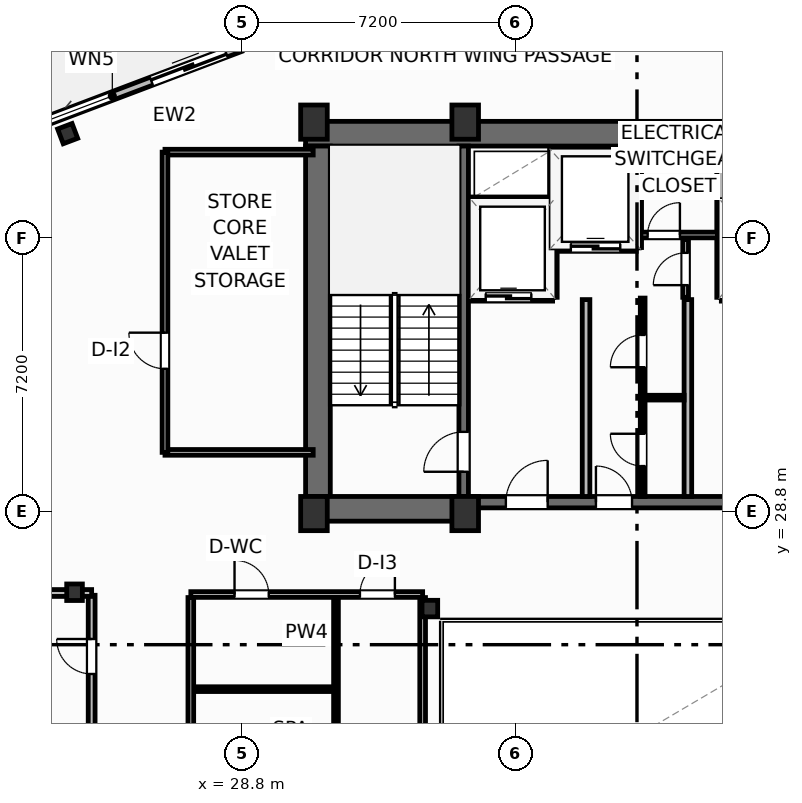
"""IFC4 building model, lengths in metres.
Left out: names, types, materials, properties, quantities, classifications, styles, units other than length and angle.
Written with IfcOpenShell. Run it as: python <this file> out.ifc"""

import sys

from ifc_helpers import new_model, si_unit, direction, frame, frame_2d, origin, origin_2d, place, context, subcontext, project, spatial, rectangle, i_section, extrude, element, fill, save


model = new_model("IFC4")
c1 = context("Model", 3, precision=1e-05, world=origin(), true_north=direction((0.0, 1.0)))
c2 = subcontext(c1, "Body", "Model", "MODEL_VIEW")
j1 = project(units=[si_unit("LENGTHUNIT", "METRE"), si_unit("PLANEANGLEUNIT", "RADIAN")], contexts=[c1])
p1 = place(None, origin())
s1 = spatial("IfcSite", under=j1, at=p1, CompositionType="ELEMENT")
p2 = place(p1, origin())
s2 = spatial("IfcBuilding", under=s1, at=p2, CompositionType="ELEMENT")
p3 = place(p2, frame((0.0, 0.0, 242.3)))
s3 = spatial("IfcBuildingStorey", under=s2, at=p3, CompositionType="ELEMENT", Elevation=242.3)
for number, where, z_axis, x_axis in (
    (1, (30.7, 28.75, 0.0), (0.0, 0.0, 1.0), (1.0, 0.0, 0.0)),
    (2, (34.68, 28.75, 0.0), (0.0, 0.0, 1.0), (1.0, 0.0, 0.0)),
    (3, (30.7, 39.05, 0.0), (0.0, 0.0, 1.0), (1.0, 0.0, 0.0)),
    (4, (34.68, 39.05, 0.0), (0.0, 0.0, 1.0), (1.0, 0.0, 0.0)),
):
    element("IfcColumn", number, at=place(p3, frame(where, z_axis=z_axis, x_axis=x_axis)), inside=s3, PredefinedType="COLUMN", context=c2, shape_type="SweptSolid", body=[
        extrude(rectangle(XDim=0.7, YDim=0.9, at=origin_2d()), origin(), (0.0, 0.0, 1.0), 3.7),
    ])
for number, where, z_axis, x_axis in (
    (5, (33.75, 26.25, 0.0), (0.0, 0.0, 1.0), (1.0, 0.0, 0.0)),
    (6, (24.4, 26.68, 0.0), (0.0, 0.0, 1.0), (1.0, 0.0, 0.0)),
):
    element("IfcColumn", number, at=place(p3, frame(where, z_axis=z_axis, x_axis=x_axis)), inside=s3, PredefinedType="COLUMN", context=c2, shape_type="SweptSolid", body=[
        extrude(i_section(OverallWidth=0.412, OverallDepth=0.435, WebThickness=0.036, FlangeThickness=0.057, FilletRadius=0.025, at=origin_2d()), origin(), (0.0, 0.0, 1.0), 3.7),
    ])
p4 = place(p3, frame((30.48, 38.745, 0.0), z_axis=(0.0, 0.0, 1.0), x_axis=(1.0, 0.0, 0.0)))
e7 = element("IfcWall", 7, at=p4, inside=s3, PredefinedType="SHEAR", context=c2, shape_type="SweptSolid", body=[
    extrude(rectangle(XDim=17.44, YDim=0.65, at=frame_2d((8.72, 0.0))), origin(), (0.0, 0.0, 1.0), 3.45),
])
p5 = place(p3, frame((30.805, 29.2, 0.0), z_axis=(0.0, 0.0, 1.0), x_axis=(0.0, 1.0, 0.0)))
e8 = element("IfcWall", 8, at=p5, inside=s3, PredefinedType="SHEAR", context=c2, shape_type="SweptSolid", body=[
    extrude(rectangle(XDim=9.22, YDim=0.65, at=frame_2d((4.61, 0.0))), origin(), (0.0, 0.0, 1.0), 3.45),
])
p6 = place(p3, frame((30.48, 28.875, 0.0), z_axis=(0.0, 0.0, 1.0), x_axis=(1.0, 0.0, 0.0)))
e9 = element("IfcWall", 9, at=p6, inside=s3, PredefinedType="SHEAR", context=c2, shape_type="SweptSolid", body=[
    extrude(rectangle(XDim=4.32, YDim=0.65, at=frame_2d((2.16, 0.0))), origin(), (0.0, 0.0, 1.0), 3.45),
])
p7 = place(p3, frame((34.8, 29.05, 0.0), z_axis=(0.0, 0.0, 1.0), x_axis=(1.0, 0.0, 0.0)))
e10 = element("IfcWall", 10, at=p7, inside=s3, PredefinedType="SHEAR", context=c2, shape_type="SweptSolid", body=[
    extrude(rectangle(XDim=8.8, YDim=0.3, at=frame_2d((4.4, 0.0))), origin(), (0.0, 0.0, 1.0), 3.45),
])
p8 = place(p7, frame((0.95, 0.0, 0.0)))
e11 = element("IfcOpeningElement", 11, at=p8, cuts=e10, PredefinedType="OPENING", context=c2, shape_type="SweptSolid", body=[
    extrude(rectangle(XDim=1.1, YDim=2.15, at=frame_2d((0.55, 1.075))), frame((0.0, 0.16, 0.0), z_axis=(0.0, -1.0, 0.0), x_axis=(1.0, 0.0, 0.0)), (0.0, 0.0, 1.0), 0.32),
])
p9 = place(p7, frame((6.75, 0.0, 0.0)))
e12 = element("IfcOpeningElement", 12, at=p9, cuts=e10, PredefinedType="OPENING", context=c2, shape_type="SweptSolid", body=[
    extrude(rectangle(XDim=1.1, YDim=2.15, at=frame_2d((0.55, 1.075))), frame((0.0, 0.16, 0.0), z_axis=(0.0, -1.0, 0.0), x_axis=(1.0, 0.0, 0.0)), (0.0, 0.0, 1.0), 0.32),
])
p10 = place(p7, frame((3.32, 0.0, 0.0)))
e13 = element("IfcOpeningElement", 13, at=p10, cuts=e10, PredefinedType="OPENING", context=c2, shape_type="SweptSolid", body=[
    extrude(rectangle(XDim=0.95, YDim=2.15, at=frame_2d((0.475, 1.075))), frame((0.0, 0.16, 0.0), z_axis=(0.0, -1.0, 0.0), x_axis=(1.0, 0.0, 0.0)), (0.0, 0.0, 1.0), 0.32),
])
p11 = place(p3, frame((34.64, 29.2, 0.0), z_axis=(0.0, 0.0, 1.0), x_axis=(0.0, 1.0, 0.0)))
e14 = element("IfcWall", 14, at=p11, inside=s3, PredefinedType="SHEAR", context=c2, shape_type="SweptSolid", body=[
    extrude(rectangle(XDim=9.22, YDim=0.25, at=frame_2d((4.61, 0.0))), origin(), (0.0, 0.0, 1.0), 3.45),
])
p12 = place(p11, frame((0.65, 0.0, 0.0)))
e15 = element("IfcOpeningElement", 15, at=p12, cuts=e14, PredefinedType="OPENING", context=c2, shape_type="SweptSolid", body=[
    extrude(rectangle(XDim=1.05, YDim=2.15, at=frame_2d((0.525, 1.075))), frame((0.0, 0.135, 0.0), z_axis=(0.0, -1.0, 0.0), x_axis=(1.0, 0.0, 0.0)), (0.0, 0.0, 1.0), 0.27),
])
p13 = place(p3, frame((24.219, 38.747, 0.0), z_axis=(0.0, 0.0, 1.0), x_axis=(0.935221751401, 0.354062530786, 0.0)))
e16 = element("IfcColumn", 16, at=p13, inside=s3, PredefinedType="COLUMN", context=c2, shape_type="SweptSolid", body=[
    extrude(i_section(OverallWidth=0.406, OverallDepth=0.416, WebThickness=0.03, FlangeThickness=0.048, FilletRadius=0.025, at=origin_2d()), origin(), (0.0, 0.0, 1.0), 3.7),
])
p14 = place(p3, frame((23.149, 38.887, 0.0), z_axis=(0.0, 0.0, 1.0), x_axis=(0.9352192676, 0.354069091436, 0.0)))
e17 = element("IfcWall", 17, at=p14, inside=s3, PredefinedType="SOLIDWALL", context=c2, shape_type="SweptSolid", body=[
    extrude(rectangle(XDim=6.0, YDim=0.22, at=frame_2d((3.0, 0.0))), origin(), (0.0, 0.0, 1.0), 2.73),
])
p15 = place(p14, frame((3.5, 0.0, 0.0)))
e18 = element("IfcOpeningElement", 18, at=p15, cuts=e17, PredefinedType="OPENING", context=c2, shape_type="SweptSolid", body=[
    extrude(rectangle(XDim=2.1, YDim=2.3, at=frame_2d((1.05, 1.15))), frame((0.0, 0.12, 0.0), z_axis=(0.0, -1.0, 0.0), x_axis=(1.0, 0.0, 0.0)), (0.0, 0.0, 1.0), 0.24),
])
p16 = place(p14, frame((0.55, 0.0, 0.75)))
e19 = element("IfcOpeningElement", 19, at=p16, cuts=e17, PredefinedType="OPENING", context=c2, shape_type="SweptSolid", body=[
    extrude(rectangle(XDim=1.85, YDim=1.75, at=frame_2d((0.925, 0.875))), frame((0.0, 0.12, 0.0), z_axis=(0.0, -1.0, 0.0), x_axis=(1.0, 0.0, 0.0)), (0.0, 0.0, 1.0), 0.24),
])
p17 = place(p3, frame((24.85, 23.03, 0.0), z_axis=(0.0, 0.0, 1.0), x_axis=(0.0, 1.0, 0.0)))
e20 = element("IfcWall", 20, at=p17, inside=s3, PredefinedType="PARTITIONING", context=c2, shape_type="SweptSolid", body=[
    extrude(rectangle(XDim=3.57, YDim=0.18, at=frame_2d((1.785, 0.0))), origin(), (0.0, 0.0, 1.0), 3.45),
])
p18 = place(p17, frame((1.5, 0.0, 0.0)))
e21 = element("IfcOpeningElement", 21, at=p18, cuts=e20, PredefinedType="OPENING", context=c2, shape_type="SweptSolid", body=[
    extrude(rectangle(XDim=0.92, YDim=2.05, at=frame_2d((0.46, 1.025))), frame((0.0, 0.1, 0.0), z_axis=(0.0, -1.0, 0.0), x_axis=(1.0, 0.0, 0.0)), (0.0, 0.0, 1.0), 0.2),
])
p19 = place(p3, frame((3.482, 26.66, 0.0), z_axis=(0.0, 0.0, 1.0), x_axis=(1.0, 0.0, 0.0)))
e22 = element("IfcWall", 22, at=p19, inside=s3, PredefinedType="PARTITIONING", context=c2, shape_type="SweptSolid", body=[
    extrude(rectangle(XDim=21.368, YDim=0.18, at=frame_2d((10.684, 0.0))), origin(), (0.0, 0.0, 1.0), 2.662),
])
for number, where, z_axis, x_axis in (
    (23, (37.86, 29.2, 0.0), (0.0, 0.0, 1.0), (0.0, 1.0, 0.0)),
    (24, (40.54, 29.2, 0.0), (0.0, 0.0, 1.0), (0.0, 1.0, 0.0)),
):
    element("IfcWall", number, at=place(p3, frame(where, z_axis=z_axis, x_axis=x_axis)), inside=s3, PredefinedType="PARTITIONING", context=c2, shape_type="SweptSolid", body=[
        extrude(rectangle(XDim=5.18, YDim=0.2, at=frame_2d((2.59, 0.0))), origin(), (0.0, 0.0, 1.0), 3.45),
    ])
p20 = place(p3, frame((34.8, 34.44, 0.0), z_axis=(0.0, 0.0, 1.0), x_axis=(1.0, 0.0, 0.0)))
e25 = element("IfcWall", 25, at=p20, inside=s3, PredefinedType="PARTITIONING", context=c2, shape_type="SweptSolid", body=[
    extrude(rectangle(XDim=2.18, YDim=0.2, at=frame_2d((1.09, 0.0))), origin(), (0.0, 0.0, 1.0), 3.45),
])
p21 = place(p20, frame((0.42, 0.0, 0.0)))
e26 = element("IfcOpeningElement", 26, at=p21, cuts=e25, PredefinedType="OPENING", context=c2, shape_type="SweptSolid", body=[
    extrude(rectangle(XDim=1.2, YDim=2.2, at=frame_2d((0.6, 1.1))), frame((0.0, 0.11, 0.0), z_axis=(0.0, -1.0, 0.0), x_axis=(1.0, 0.0, 0.0)), (0.0, 0.0, 1.0), 0.22),
])
p22 = place(p3, frame((34.8, 36.98, 0.0), z_axis=(0.0, 0.0, 1.0), x_axis=(1.0, 0.0, 0.0)))
e27 = element("IfcWall", 27, at=p22, inside=s3, PredefinedType="PARTITIONING", context=c2, shape_type="SweptSolid", body=[
    extrude(rectangle(XDim=2.18, YDim=0.2, at=frame_2d((1.09, 0.0))), origin(), (0.0, 0.0, 1.0), 3.45),
])
for number, where, z_axis, x_axis in (
    (28, (37.0, 34.44, 0.0), (0.0, 0.0, 1.0), (0.0, 1.0, 0.0)),
    (29, (41.4, 34.44, 0.0), (0.0, 0.0, 1.0), (0.0, 1.0, 0.0)),
):
    element("IfcWall", number, at=place(p3, frame(where, z_axis=z_axis, x_axis=x_axis)), inside=s3, PredefinedType="PARTITIONING", context=c2, shape_type="SweptSolid", body=[
        extrude(rectangle(XDim=3.9, YDim=0.2, at=frame_2d((1.95, 0.0))), origin(), (0.0, 0.0, 1.0), 3.45),
    ])
p23 = place(p3, frame((37.06, 35.75, 0.0), z_axis=(0.0, 0.0, 1.0), x_axis=(1.0, 0.0, 0.0)))
e30 = element("IfcWall", 30, at=p23, inside=s3, PredefinedType="PARTITIONING", context=c2, shape_type="SweptSolid", body=[
    extrude(rectangle(XDim=2.12, YDim=0.2, at=frame_2d((1.06, 0.0))), origin(), (0.0, 0.0, 1.0), 3.45),
])
p24 = place(p23, frame((0.4, 0.0, 0.0)))
e31 = element("IfcOpeningElement", 31, at=p24, cuts=e30, PredefinedType="OPENING", context=c2, shape_type="SweptSolid", body=[
    extrude(rectangle(XDim=1.3, YDim=2.2, at=frame_2d((0.65, 1.1))), frame((0.0, 0.11, 0.0), z_axis=(0.0, -1.0, 0.0), x_axis=(1.0, 0.0, 0.0)), (0.0, 0.0, 1.0), 0.22),
])
p25 = place(p3, frame((39.22, 35.75, 0.0), z_axis=(0.0, 0.0, 1.0), x_axis=(0.0, 1.0, 0.0)))
e32 = element("IfcWall", 32, at=p25, inside=s3, PredefinedType="PARTITIONING", context=c2, shape_type="SweptSolid", body=[
    extrude(rectangle(XDim=2.59, YDim=0.2, at=frame_2d((1.295, 0.0))), origin(), (0.0, 0.0, 1.0), 3.45),
])
p26 = place(p3, frame((39.3, 36.08, 0.0), z_axis=(0.0, 0.0, 1.0), x_axis=(1.0, 0.0, 0.0)))
e33 = element("IfcWall", 33, at=p26, inside=s3, PredefinedType="PARTITIONING", context=c2, shape_type="SweptSolid", body=[
    extrude(rectangle(XDim=2.02, YDim=0.15, at=frame_2d((1.01, 0.0))), origin(), (0.0, 0.0, 1.0), 3.45),
])
p27 = place(p26, frame((0.18, 0.0, 0.0)))
e34 = element("IfcOpeningElement", 34, at=p27, cuts=e33, PredefinedType="OPENING", context=c2, shape_type="SweptSolid", body=[
    extrude(rectangle(XDim=0.85, YDim=2.05, at=frame_2d((0.425, 1.025))), frame((0.0, 0.085, 0.0), z_axis=(0.0, -1.0, 0.0), x_axis=(1.0, 0.0, 0.0)), (0.0, 0.0, 1.0), 0.17),
])
p28 = place(p3, frame((40.48, 34.44, 0.0), z_axis=(0.0, 0.0, 1.0), x_axis=(0.0, 1.0, 0.0)))
e35 = element("IfcWall", 35, at=p28, inside=s3, PredefinedType="PARTITIONING", context=c2, shape_type="SweptSolid", body=[
    extrude(rectangle(XDim=1.52, YDim=0.15, at=frame_2d((0.76, 0.0))), origin(), (0.0, 0.0, 1.0), 3.45),
])
p29 = place(p28, frame((0.32, 0.0, 0.0)))
e36 = element("IfcOpeningElement", 36, at=p29, cuts=e35, PredefinedType="OPENING", context=c2, shape_type="SweptSolid", body=[
    extrude(rectangle(XDim=0.85, YDim=2.05, at=frame_2d((0.425, 1.025))), frame((0.0, 0.085, 0.0), z_axis=(0.0, -1.0, 0.0), x_axis=(1.0, 0.0, 0.0)), (0.0, 0.0, 1.0), 0.17),
])
p30 = place(p3, frame((39.35, 31.8, 0.0), z_axis=(0.0, 0.0, 1.0), x_axis=(1.0, 0.0, 0.0)))
e37 = element("IfcWall", 37, at=p30, inside=s3, PredefinedType="PARTITIONING", context=c2, shape_type="SweptSolid", body=[
    extrude(rectangle(XDim=1.09, YDim=0.125, at=frame_2d((0.545, 0.0))), origin(), (0.0, 0.0, 1.0), 3.45),
])
p31 = place(p3, frame((39.35, 29.2, 0.0), z_axis=(0.0, 0.0, 1.0), x_axis=(0.0, 1.0, 0.0)))
e38 = element("IfcWall", 38, at=p31, inside=s3, PredefinedType="PARTITIONING", context=c2, shape_type="SweptSolid", body=[
    extrude(rectangle(XDim=5.22, YDim=0.125, at=frame_2d((2.61, 0.0))), origin(), (0.0, 0.0, 1.0), 3.45),
])
p32 = place(p31, frame((0.8, 0.0, 0.0)))
e39 = element("IfcOpeningElement", 39, at=p32, cuts=e38, PredefinedType="OPENING", context=c2, shape_type="SweptSolid", body=[
    extrude(rectangle(XDim=0.85, YDim=2.05, at=frame_2d((0.425, 1.025))), frame((0.0, 0.073, 0.0), z_axis=(0.0, -1.0, 0.0), x_axis=(1.0, 0.0, 0.0)), (0.0, 0.0, 1.0), 0.145),
])
p33 = place(p31, frame((3.4, 0.0, 0.0)))
e40 = element("IfcOpeningElement", 40, at=p33, cuts=e38, PredefinedType="OPENING", context=c2, shape_type="SweptSolid", body=[
    extrude(rectangle(XDim=0.85, YDim=2.05, at=frame_2d((0.425, 1.025))), frame((0.0, 0.073, 0.0), z_axis=(0.0, -1.0, 0.0), x_axis=(1.0, 0.0, 0.0)), (0.0, 0.0, 1.0), 0.145),
])
p34 = place(p3, frame((27.46, 26.62, 0.0), z_axis=(0.0, 0.0, 1.0), x_axis=(1.0, 0.0, 0.0)))
e41 = element("IfcWall", 41, at=p34, inside=s3, PredefinedType="PARTITIONING", context=c2, shape_type="SweptSolid", body=[
    extrude(rectangle(XDim=6.1, YDim=0.15, at=frame_2d((3.05, 0.0))), origin(), (0.0, 0.0, 1.0), 2.662),
])
p35 = place(p34, frame((1.15, 0.0, 0.0)))
e42 = element("IfcOpeningElement", 42, at=p35, cuts=e41, PredefinedType="OPENING", context=c2, shape_type="SweptSolid", body=[
    extrude(rectangle(XDim=0.9, YDim=2.05, at=frame_2d((0.45, 1.025))), frame((0.0, 0.085, 0.0), z_axis=(0.0, -1.0, 0.0), x_axis=(1.0, 0.0, 0.0)), (0.0, 0.0, 1.0), 0.17),
])
p36 = place(p34, frame((4.45, 0.0, 0.0)))
e43 = element("IfcOpeningElement", 43, at=p36, cuts=e41, PredefinedType="OPENING", context=c2, shape_type="SweptSolid", body=[
    extrude(rectangle(XDim=0.92, YDim=2.05, at=frame_2d((0.46, 1.025))), frame((0.0, 0.085, 0.0), z_axis=(0.0, -1.0, 0.0), x_axis=(1.0, 0.0, 0.0)), (0.0, 0.0, 1.0), 0.17),
])
p37 = place(p3, frame((31.28, 19.38, 0.0), z_axis=(0.0, 0.0, 1.0), x_axis=(0.0, 1.0, 0.0)))
e44 = element("IfcWall", 44, at=p37, inside=s3, PredefinedType="PARTITIONING", context=c2, shape_type="SweptSolid", body=[
    extrude(rectangle(XDim=7.16, YDim=0.125, at=frame_2d((3.58, 0.0))), origin(), (0.0, 0.0, 1.0), 3.45),
])
p38 = place(p3, frame((27.52, 24.13, 0.0), z_axis=(0.0, 0.0, 1.0), x_axis=(1.0, 0.0, 0.0)))
e45 = element("IfcWall", 45, at=p38, inside=s3, PredefinedType="PARTITIONING", context=c2, shape_type="SweptSolid", body=[
    extrude(rectangle(XDim=3.7, YDim=0.125, at=frame_2d((1.85, 0.0))), origin(), (0.0, 0.0, 1.0), 3.45),
])
p39 = place(p3, frame((27.46, 19.38, 0.0), z_axis=(0.0, 0.0, 1.0), x_axis=(0.0, 1.0, 0.0)))
e46 = element("IfcWall", 46, at=p39, inside=s3, PredefinedType="PARTITIONING", context=c2, shape_type="SweptSolid", body=[
    extrude(rectangle(XDim=7.16, YDim=0.15, at=frame_2d((3.58, 0.0))), origin(), (0.0, 0.0, 1.0), 3.45),
])
p40 = place(p39, frame((1.4, 0.0, 0.0)))
e47 = element("IfcOpeningElement", 47, at=p40, cuts=e46, PredefinedType="OPENING", context=c2, shape_type="SweptSolid", body=[
    extrude(rectangle(XDim=0.95, YDim=2.05, at=frame_2d((0.475, 1.025))), frame((0.0, 0.085, 0.0), z_axis=(0.0, -1.0, 0.0), x_axis=(1.0, 0.0, 0.0)), (0.0, 0.0, 1.0), 0.17),
])
p41 = place(p3, frame((33.56, 19.38, 0.0), z_axis=(0.0, 0.0, 1.0), x_axis=(0.0, 1.0, 0.0)))
e48 = element("IfcWall", 48, at=p41, inside=s3, PredefinedType="PARTITIONING", context=c2, shape_type="SweptSolid", body=[
    extrude(rectangle(XDim=7.16, YDim=0.15, at=frame_2d((3.58, 0.0))), origin(), (0.0, 0.0, 1.0), 2.824),
])
for number, where, z_axis, x_axis in (
    (49, (26.78, 30.36, 0.0), (0.0, 0.0, 1.0), (1.0, 0.0, 0.0)),
    (50, (26.78, 38.26, 0.0), (0.0, 0.0, 1.0), (1.0, 0.0, 0.0)),
):
    element("IfcWall", number, at=place(p3, frame(where, z_axis=z_axis, x_axis=x_axis)), inside=s3, PredefinedType="PARTITIONING", context=c2, shape_type="SweptSolid", body=[
        extrude(rectangle(XDim=3.9, YDim=0.15, at=frame_2d((1.95, 0.0))), origin(), (0.0, 0.0, 1.0), 3.45),
    ])
p42 = place(p3, frame((26.78, 30.36, 0.0), z_axis=(0.0, 0.0, 1.0), x_axis=(0.0, 1.0, 0.0)))
e51 = element("IfcWall", 51, at=p42, inside=s3, PredefinedType="PARTITIONING", context=c2, shape_type="SweptSolid", body=[
    extrude(rectangle(XDim=7.9, YDim=0.15, at=frame_2d((3.95, 0.0))), origin(), (0.0, 0.0, 1.0), 3.45),
])
p43 = place(p42, frame((2.2, 0.0, 0.0)))
e52 = element("IfcOpeningElement", 52, at=p43, cuts=e51, PredefinedType="OPENING", context=c2, shape_type="SweptSolid", body=[
    extrude(rectangle(XDim=0.95, YDim=2.05, at=frame_2d((0.475, 1.025))), frame((0.0, 0.085, 0.0), z_axis=(0.0, -1.0, 0.0), x_axis=(1.0, 0.0, 0.0)), (0.0, 0.0, 1.0), 0.17),
])
p44 = place(p15, origin())
e53 = element("IfcDoor", 53, at=p44, inside=s3, OperationType="SLIDING_TO_LEFT", PredefinedType="DOOR", context=c2, shape_type="SweptSolid", body=[
    extrude(rectangle(XDim=2.1, YDim=2.3, at=frame_2d((1.05, 1.15))), frame((0.0, 0.025, 0.0), z_axis=(0.0, -1.0, 0.0), x_axis=(1.0, 0.0, 0.0)), (0.0, 0.0, 1.0), 0.05),
])
fill(e18, e53)
p45 = place(p16, origin())
e54 = element("IfcWindow", 54, at=p45, inside=s3, PartitioningType="SINGLE_PANEL", PredefinedType="WINDOW", context=c2, shape_type="SweptSolid", body=[
    extrude(rectangle(XDim=1.85, YDim=1.75, at=frame_2d((0.925, 0.875))), frame((0.0, 0.03, 0.0), z_axis=(0.0, -1.0, 0.0), x_axis=(1.0, 0.0, 0.0)), (0.0, 0.0, 1.0), 0.06),
])
fill(e19, e54)
p46 = place(p18, origin())
e55 = element("IfcDoor", 55, at=p46, inside=s3, OperationType="SINGLE_SWING_RIGHT", PredefinedType="DOOR", context=c2, shape_type="SweptSolid", body=[
    extrude(rectangle(XDim=0.92, YDim=2.05, at=frame_2d((0.46, 1.025))), frame((0.0, 0.025, 0.0), z_axis=(0.0, -1.0, 0.0), x_axis=(1.0, 0.0, 0.0)), (0.0, 0.0, 1.0), 0.05),
])
fill(e21, e55)
p47 = place(p12, origin())
e56 = element("IfcDoor", 56, at=p47, inside=s3, OperationType="SINGLE_SWING_LEFT", PredefinedType="DOOR", context=c2, shape_type="SweptSolid", body=[
    extrude(rectangle(XDim=1.05, YDim=2.15, at=frame_2d((0.525, 1.075))), frame((0.0, 0.025, 0.0), z_axis=(0.0, -1.0, 0.0), x_axis=(1.0, 0.0, 0.0)), (0.0, 0.0, 1.0), 0.05),
])
fill(e15, e56)
p48 = place(p8, origin())
e57 = element("IfcDoor", 57, at=p48, inside=s3, OperationType="SINGLE_SWING_RIGHT", PredefinedType="DOOR", context=c2, shape_type="SweptSolid", body=[
    extrude(rectangle(XDim=1.1, YDim=2.15, at=frame_2d((0.55, 1.075))), frame((0.0, 0.025, 0.0), z_axis=(0.0, -1.0, 0.0), x_axis=(1.0, 0.0, 0.0)), (0.0, 0.0, 1.0), 0.05),
])
fill(e11, e57)
p49 = place(p21, origin())
e58 = element("IfcDoor", 58, at=p49, inside=s3, OperationType="SLIDING_TO_LEFT", PredefinedType="DOOR", context=c2, shape_type="SweptSolid", body=[
    extrude(rectangle(XDim=1.2, YDim=2.2, at=frame_2d((0.6, 1.1))), frame((0.0, 0.025, 0.0), z_axis=(0.0, -1.0, 0.0), x_axis=(1.0, 0.0, 0.0)), (0.0, 0.0, 1.0), 0.05),
])
fill(e26, e58)
p50 = place(p24, origin())
e59 = element("IfcDoor", 59, at=p50, inside=s3, OperationType="SLIDING_TO_LEFT", PredefinedType="DOOR", context=c2, shape_type="SweptSolid", body=[
    extrude(rectangle(XDim=1.3, YDim=2.2, at=frame_2d((0.65, 1.1))), frame((0.0, 0.025, 0.0), z_axis=(0.0, -1.0, 0.0), x_axis=(1.0, 0.0, 0.0)), (0.0, 0.0, 1.0), 0.05),
])
fill(e31, e59)
p51 = place(p27, origin())
e60 = element("IfcDoor", 60, at=p51, inside=s3, OperationType="SINGLE_SWING_RIGHT", PredefinedType="DOOR", context=c2, shape_type="SweptSolid", body=[
    extrude(rectangle(XDim=0.85, YDim=2.05, at=frame_2d((0.425, 1.025))), frame((0.0, 0.025, 0.0), z_axis=(0.0, -1.0, 0.0), x_axis=(1.0, 0.0, 0.0)), (0.0, 0.0, 1.0), 0.05),
])
fill(e34, e60)
p52 = place(p29, origin())
e61 = element("IfcDoor", 61, at=p52, inside=s3, OperationType="SINGLE_SWING_LEFT", PredefinedType="DOOR", context=c2, shape_type="SweptSolid", body=[
    extrude(rectangle(XDim=0.85, YDim=2.05, at=frame_2d((0.425, 1.025))), frame((0.0, 0.025, 0.0), z_axis=(0.0, -1.0, 0.0), x_axis=(1.0, 0.0, 0.0)), (0.0, 0.0, 1.0), 0.05),
])
fill(e36, e61)
p53 = place(p32, origin())
e62 = element("IfcDoor", 62, at=p53, inside=s3, OperationType="SINGLE_SWING_RIGHT", PredefinedType="DOOR", context=c2, shape_type="SweptSolid", body=[
    extrude(rectangle(XDim=0.85, YDim=2.05, at=frame_2d((0.425, 1.025))), frame((0.0, 0.025, 0.0), z_axis=(0.0, -1.0, 0.0), x_axis=(1.0, 0.0, 0.0)), (0.0, 0.0, 1.0), 0.05),
])
fill(e39, e62)
p54 = place(p33, origin())
e63 = element("IfcDoor", 63, at=p54, inside=s3, OperationType="SINGLE_SWING_LEFT", PredefinedType="DOOR", context=c2, shape_type="SweptSolid", body=[
    extrude(rectangle(XDim=0.85, YDim=2.05, at=frame_2d((0.425, 1.025))), frame((0.0, 0.025, 0.0), z_axis=(0.0, -1.0, 0.0), x_axis=(1.0, 0.0, 0.0)), (0.0, 0.0, 1.0), 0.05),
])
fill(e40, e63)
p55 = place(p10, origin())
e64 = element("IfcDoor", 64, at=p55, inside=s3, OperationType="SINGLE_SWING_LEFT", PredefinedType="DOOR", context=c2, shape_type="SweptSolid", body=[
    extrude(rectangle(XDim=0.95, YDim=2.15, at=frame_2d((0.475, 1.075))), frame((0.0, 0.025, 0.0), z_axis=(0.0, -1.0, 0.0), x_axis=(1.0, 0.0, 0.0)), (0.0, 0.0, 1.0), 0.05),
])
fill(e13, e64)
p56 = place(p35, origin())
e65 = element("IfcDoor", 65, at=p56, inside=s3, OperationType="SINGLE_SWING_LEFT", PredefinedType="DOOR", context=c2, shape_type="SweptSolid", body=[
    extrude(rectangle(XDim=0.9, YDim=2.05, at=frame_2d((0.45, 1.025))), frame((0.0, 0.025, 0.0), z_axis=(0.0, -1.0, 0.0), x_axis=(1.0, 0.0, 0.0)), (0.0, 0.0, 1.0), 0.05),
])
fill(e42, e65)
p57 = place(p36, origin())
e66 = element("IfcDoor", 66, at=p57, inside=s3, OperationType="SINGLE_SWING_RIGHT", PredefinedType="DOOR", context=c2, shape_type="SweptSolid", body=[
    extrude(rectangle(XDim=0.92, YDim=2.05, at=frame_2d((0.46, 1.025))), frame((0.0, 0.025, 0.0), z_axis=(0.0, -1.0, 0.0), x_axis=(1.0, 0.0, 0.0)), (0.0, 0.0, 1.0), 0.05),
])
fill(e43, e66)
p58 = place(p43, origin())
e67 = element("IfcDoor", 67, at=p58, inside=s3, OperationType="SINGLE_SWING_RIGHT", PredefinedType="DOOR", context=c2, shape_type="SweptSolid", body=[
    extrude(rectangle(XDim=0.95, YDim=2.05, at=frame_2d((0.475, 1.025))), frame((0.0, 0.025, 0.0), z_axis=(0.0, -1.0, 0.0), x_axis=(1.0, 0.0, 0.0)), (0.0, 0.0, 1.0), 0.05),
])
fill(e52, e67)
save(model, sys.argv[1])
